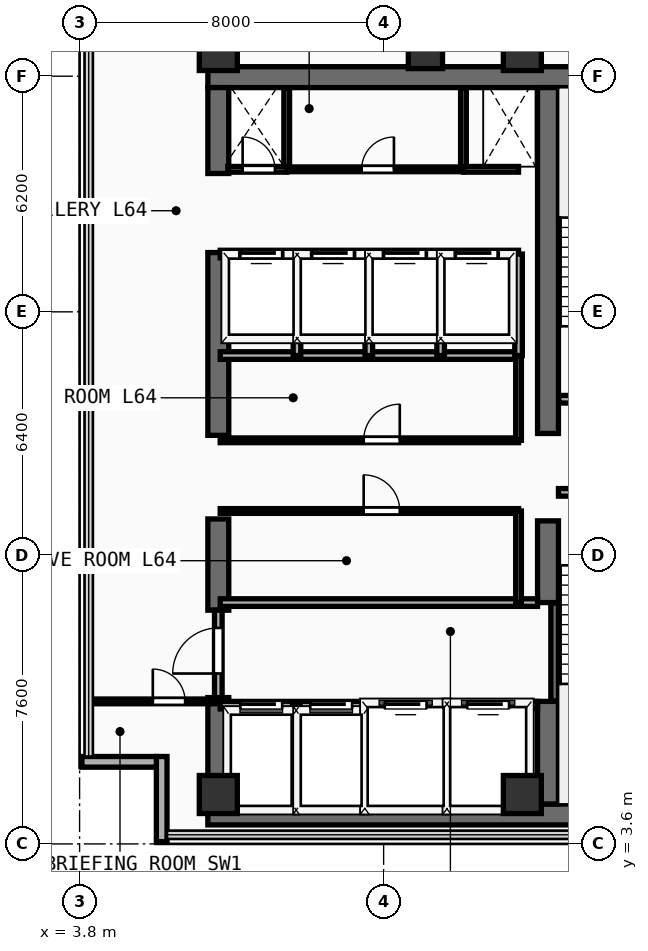
"""IFC4 building model, lengths in metres.
Left out: names, types, materials, properties, quantities, classifications, styles, units other than length and angle.
Written with IfcOpenShell. Run it as: python <this file> out.ifc"""

import sys

from ifc_helpers import new_model, si_unit, direction, frame, frame_2d, origin, origin_2d, place, context, subcontext, project, spatial, rectangle, extrude, element, fill, save


model = new_model("IFC4")
c1 = context("Model", 3, precision=1e-05, world=origin(), true_north=direction((0.0, 1.0)))
c2 = subcontext(c1, "Body", "Model", "MODEL_VIEW")
j1 = project(units=[si_unit("LENGTHUNIT", "METRE"), si_unit("PLANEANGLEUNIT", "RADIAN")], contexts=[c1])
p1 = place(None, origin())
s1 = spatial("IfcSite", under=j1, at=p1, CompositionType="ELEMENT")
p2 = place(p1, origin())
s2 = spatial("IfcBuilding", under=s1, at=p2, CompositionType="ELEMENT")
p3 = place(p2, frame((0.0, 0.0, 250.1)))
s3 = spatial("IfcBuildingStorey", under=s2, at=p3, CompositionType="ELEMENT", Elevation=250.1)
for number, where, z_axis, x_axis in (
    (1, (7.175, 4.375, 0.0), (0.0, 0.0, 1.0), (1.0, 0.0, 0.0)),
    (2, (7.175, 23.775, 0.0), (0.0, 0.0, 1.0), (1.0, 0.0, 0.0)),
):
    element("IfcWall", number, at=place(p3, frame(where, z_axis=z_axis, x_axis=x_axis)), inside=s3, PredefinedType="SHEAR", context=c2, shape_type="SweptSolid", body=[
        extrude(rectangle(XDim=13.9, YDim=0.55, at=frame_2d((6.95, 0.0))), origin(), (0.0, 0.0, 1.0), 3.56),
    ])
p4 = place(p3, frame((7.45, 4.65, 0.0), z_axis=(0.0, 0.0, 1.0), x_axis=(0.0, 1.0, 0.0)))
e3 = element("IfcWall", 3, at=p4, inside=s3, PredefinedType="SHEAR", context=c2, shape_type="SweptSolid", body=[
    extrude(rectangle(XDim=2.8, YDim=0.55, at=frame_2d((1.4, 0.0))), origin(), (0.0, 0.0, 1.0), 3.56),
])
p5 = place(p3, frame((7.45, 9.75, 0.0), z_axis=(0.0, 0.0, 1.0), x_axis=(0.0, 1.0, 0.0)))
e4 = element("IfcWall", 4, at=p5, inside=s3, PredefinedType="SHEAR", context=c2, shape_type="SweptSolid", body=[
    extrude(rectangle(XDim=2.4, YDim=0.55, at=frame_2d((1.2, 0.0))), origin(), (0.0, 0.0, 1.0), 3.56),
])
p6 = place(p3, frame((7.45, 14.35, 0.0), z_axis=(0.0, 0.0, 1.0), x_axis=(0.0, 1.0, 0.0)))
e5 = element("IfcWall", 5, at=p6, inside=s3, PredefinedType="SHEAR", context=c2, shape_type="SweptSolid", body=[
    extrude(rectangle(XDim=4.81, YDim=0.55, at=frame_2d((2.405, 0.0))), origin(), (0.0, 0.0, 1.0), 3.56),
])
p7 = place(p3, frame((7.45, 21.24, 0.0), z_axis=(0.0, 0.0, 1.0), x_axis=(0.0, 1.0, 0.0)))
e6 = element("IfcWall", 6, at=p7, inside=s3, PredefinedType="SHEAR", context=c2, shape_type="SweptSolid", body=[
    extrude(rectangle(XDim=2.26, YDim=0.55, at=frame_2d((1.13, 0.0))), origin(), (0.0, 0.0, 1.0), 3.56),
])
p8 = place(p3, frame((16.125, 4.65, 0.0), z_axis=(0.0, 0.0, 1.0), x_axis=(0.0, 1.0, 0.0)))
e7 = element("IfcWall", 7, at=p8, inside=s3, PredefinedType="SHEAR", context=c2, shape_type="SweptSolid", body=[
    extrude(rectangle(XDim=2.7, YDim=0.55, at=frame_2d((1.35, 0.0))), origin(), (0.0, 0.0, 1.0), 3.56),
])
p9 = place(p3, frame((16.125, 9.95, 0.0), z_axis=(0.0, 0.0, 1.0), x_axis=(0.0, 1.0, 0.0)))
e8 = element("IfcWall", 8, at=p9, inside=s3, PredefinedType="SHEAR", context=c2, shape_type="SweptSolid", body=[
    extrude(rectangle(XDim=2.15, YDim=0.55, at=frame_2d((1.075, 0.0))), origin(), (0.0, 0.0, 1.0), 3.56),
])
p10 = place(p3, frame((16.125, 14.4, 0.0), z_axis=(0.0, 0.0, 1.0), x_axis=(0.0, 1.0, 0.0)))
e9 = element("IfcWall", 9, at=p10, inside=s3, PredefinedType="SHEAR", context=c2, shape_type="SweptSolid", body=[
    extrude(rectangle(XDim=9.1, YDim=0.55, at=frame_2d((4.55, 0.0))), origin(), (0.0, 0.0, 1.0), 3.56),
])
for number, where, z_axis, x_axis in (
    (10, (7.45, 4.9, 0.0), (0.0, 0.0, 1.0), (1.0, 0.0, 0.0)),
    (11, (15.45, 4.9, 0.0), (0.0, 0.0, 1.0), (1.0, 0.0, 0.0)),
    (12, (7.45, 24.45, 0.0), (0.0, 0.0, 1.0), (1.0, 0.0, 0.0)),
    (13, (15.45, 24.45, 0.0), (0.0, 0.0, 1.0), (1.0, 0.0, 0.0)),
):
    element("IfcColumn", number, at=place(p3, frame(where, z_axis=z_axis, x_axis=x_axis)), inside=s3, PredefinedType="COLUMN", context=c2, shape_type="SweptSolid", body=[
        extrude(rectangle(XDim=1.0, YDim=1.0, at=origin_2d()), origin(), (0.0, 0.0, 1.0), 3.56),
    ])
p11 = place(p3, frame((12.9, 24.45, 0.0), z_axis=(0.0, 0.0, 1.0), x_axis=(1.0, 0.0, 0.0)))
e14 = element("IfcColumn", 14, at=p11, inside=s3, PredefinedType="COLUMN", context=c2, shape_type="SweptSolid", body=[
    extrude(rectangle(XDim=0.9, YDim=0.9, at=origin_2d()), origin(), (0.0, 0.0, 1.0), 3.56),
])
p12 = place(p3, frame((5.96, 3.66, 0.0), z_axis=(0.0, 0.0, 1.0), x_axis=(0.0, 1.0, 0.0)))
e15 = element("IfcWall", 15, at=p12, inside=s3, PredefinedType="SOLIDWALL", context=c2, shape_type="SweptSolid", body=[
    extrude(rectangle(XDim=2.24, YDim=0.28, at=frame_2d((1.12, 0.0))), origin(), (0.0, 0.0, 1.0), 3.56),
])
p13 = place(p3, frame((3.86, 5.76, 0.0), z_axis=(0.0, 0.0, 1.0), x_axis=(1.0, 0.0, 0.0)))
e16 = element("IfcWall", 16, at=p13, inside=s3, PredefinedType="SOLIDWALL", context=c2, shape_type="SweptSolid", body=[
    extrude(rectangle(XDim=1.96, YDim=0.28, at=frame_2d((0.98, 0.0))), origin(), (0.0, 0.0, 1.0), 3.56),
])
p14 = place(p3, frame((16.3, 7.36, 0.0), z_axis=(0.0, 0.0, 1.0), x_axis=(0.0, 1.0, 0.0)))
e17 = element("IfcWall", 17, at=p14, inside=s3, PredefinedType="SHEAR", context=c2, shape_type="SweptSolid", body=[
    extrude(rectangle(XDim=2.58, YDim=0.2, at=frame_2d((1.29, 0.0))), origin(), (0.0, 0.0, 1.0), 3.56),
])
p15 = place(p3, frame((16.4, 12.85, 0.0), z_axis=(0.0, 0.0, 1.0), x_axis=(1.0, 0.0, 0.0)))
e18 = element("IfcWall", 18, at=p15, inside=s3, PredefinedType="PARTITIONING", context=c2, shape_type="SweptSolid", body=[
    extrude(rectangle(XDim=3.96, YDim=0.2, at=frame_2d((1.98, 0.0))), origin(), (0.0, 0.0, 1.0), 3.56),
])
p16 = place(p15, frame((1.304, 0.0, 0.0)))
e19 = element("IfcOpeningElement", 19, at=p16, cuts=e18, PredefinedType="OPENING", context=c2, shape_type="SweptSolid", body=[
    extrude(rectangle(XDim=1.1, YDim=2.2, at=frame_2d((0.55, 1.1))), frame((0.0, 0.11, 0.0), z_axis=(0.0, -1.0, 0.0), x_axis=(1.0, 0.0, 0.0)), (0.0, 0.0, 1.0), 0.22),
])
p17 = place(p3, frame((16.41, 15.3, 0.0), z_axis=(0.0, 0.0, 1.0), x_axis=(1.0, 0.0, 0.0)))
e20 = element("IfcWall", 20, at=p17, inside=s3, PredefinedType="PARTITIONING", context=c2, shape_type="SweptSolid", body=[
    extrude(rectangle(XDim=3.95, YDim=0.2, at=frame_2d((1.975, 0.0))), origin(), (0.0, 0.0, 1.0), 3.56),
])
p18 = place(p17, frame((1.294, 0.0, 0.0)))
e21 = element("IfcOpeningElement", 21, at=p18, cuts=e20, PredefinedType="OPENING", context=c2, shape_type="SweptSolid", body=[
    extrude(rectangle(XDim=1.1, YDim=2.2, at=frame_2d((0.55, 1.1))), frame((0.0, 0.11, 0.0), z_axis=(0.0, -1.0, 0.0), x_axis=(1.0, 0.0, 0.0)), (0.0, 0.0, 1.0), 0.22),
])
p19 = place(p3, frame((7.5, 7.25, 0.0), z_axis=(0.0, 0.0, 1.0), x_axis=(1.0, 0.0, 0.0)))
e22 = element("IfcWall", 22, at=p19, inside=s3, PredefinedType="PARTITIONING", context=c2, shape_type="SweptSolid", body=[
    extrude(rectangle(XDim=8.35, YDim=0.2, at=frame_2d((4.175, 0.0))), origin(), (0.0, 0.0, 1.0), 3.56),
])
p20 = place(p19, frame((0.53, 0.0, 0.0)))
e23 = element("IfcOpeningElement", 23, at=p20, cuts=e22, PredefinedType="OPENING", context=c2, shape_type="SweptSolid", body=[
    extrude(rectangle(XDim=1.1, YDim=2.2, at=frame_2d((0.55, 1.1))), frame((0.0, 0.11, 0.0), z_axis=(0.0, -1.0, 0.0), x_axis=(1.0, 0.0, 0.0)), (0.0, 0.0, 1.0), 0.22),
])
p21 = place(p19, frame((2.37, 0.0, 0.0)))
e24 = element("IfcOpeningElement", 24, at=p21, cuts=e22, PredefinedType="OPENING", context=c2, shape_type="SweptSolid", body=[
    extrude(rectangle(XDim=1.1, YDim=2.2, at=frame_2d((0.55, 1.1))), frame((0.0, 0.11, 0.0), z_axis=(0.0, -1.0, 0.0), x_axis=(1.0, 0.0, 0.0)), (0.0, 0.0, 1.0), 0.22),
])
p22 = place(p19, frame((4.33, 0.0, 0.0)))
e25 = element("IfcOpeningElement", 25, at=p22, cuts=e22, PredefinedType="OPENING", context=c2, shape_type="SweptSolid", body=[
    extrude(rectangle(XDim=1.1, YDim=2.2, at=frame_2d((0.55, 1.1))), frame((0.0, 0.11, 0.0), z_axis=(0.0, -1.0, 0.0), x_axis=(1.0, 0.0, 0.0)), (0.0, 0.0, 1.0), 0.22),
])
p23 = place(p19, frame((6.5, 0.0, 0.0)))
e26 = element("IfcOpeningElement", 26, at=p23, cuts=e22, PredefinedType="OPENING", context=c2, shape_type="SweptSolid", body=[
    extrude(rectangle(XDim=1.1, YDim=2.2, at=frame_2d((0.55, 1.1))), frame((0.0, 0.11, 0.0), z_axis=(0.0, -1.0, 0.0), x_axis=(1.0, 0.0, 0.0)), (0.0, 0.0, 1.0), 0.22),
])
p24 = place(p3, frame((7.5, 9.95, 0.0), z_axis=(0.0, 0.0, 1.0), x_axis=(1.0, 0.0, 0.0)))
e27 = element("IfcWall", 27, at=p24, inside=s3, PredefinedType="PARTITIONING", context=c2, shape_type="SweptSolid", body=[
    extrude(rectangle(XDim=8.35, YDim=0.2, at=frame_2d((4.175, 0.0))), origin(), (0.0, 0.0, 1.0), 3.56),
])
for number, where, z_axis, x_axis in (
    (28, (9.5, 4.45, 0.0), (0.0, 0.0, 1.0), (0.0, 1.0, 0.0)),
    (29, (11.36, 4.45, 0.0), (0.0, 0.0, 1.0), (0.0, 1.0, 0.0)),
    (30, (13.46, 4.45, 0.0), (0.0, 0.0, 1.0), (0.0, 1.0, 0.0)),
):
    element("IfcWall", number, at=place(p3, frame(where, z_axis=z_axis, x_axis=x_axis)), inside=s3, PredefinedType="PARTITIONING", context=c2, shape_type="SweptSolid", body=[
        extrude(rectangle(XDim=2.8, YDim=0.2, at=frame_2d((1.4, 0.0))), origin(), (0.0, 0.0, 1.0), 3.56),
    ])
p25 = place(p3, frame((7.45, 7.45, 0.0), z_axis=(0.0, 0.0, 1.0), x_axis=(0.0, 1.0, 0.0)))
e31 = element("IfcWall", 31, at=p25, inside=s3, PredefinedType="PARTITIONING", context=c2, shape_type="SweptSolid", body=[
    extrude(rectangle(XDim=2.3, YDim=0.2, at=frame_2d((1.15, 0.0))), origin(), (0.0, 0.0, 1.0), 2.54),
])
p26 = place(p25, frame((0.633, 0.0, 0.0)))
e32 = element("IfcOpeningElement", 32, at=p26, cuts=e31, PredefinedType="OPENING", context=c2, shape_type="SweptSolid", body=[
    extrude(rectangle(XDim=1.2, YDim=2.25, at=frame_2d((0.6, 1.125))), frame((0.0, 0.11, 0.0), z_axis=(0.0, -1.0, 0.0), x_axis=(1.0, 0.0, 0.0)), (0.0, 0.0, 1.0), 0.22),
])
p27 = place(p3, frame((7.5, 16.45, 0.0), z_axis=(0.0, 0.0, 1.0), x_axis=(1.0, 0.0, 0.0)))
e33 = element("IfcWall", 33, at=p27, inside=s3, PredefinedType="PARTITIONING", context=c2, shape_type="SweptSolid", body=[
    extrude(rectangle(XDim=7.85, YDim=0.2, at=frame_2d((3.925, 0.0))), origin(), (0.0, 0.0, 1.0), 3.56),
])
p28 = place(p3, frame((7.5, 12.36, 0.0), z_axis=(0.0, 0.0, 1.0), x_axis=(1.0, 0.0, 0.0)))
e34 = element("IfcWall", 34, at=p28, inside=s3, PredefinedType="PARTITIONING", context=c2, shape_type="SweptSolid", body=[
    extrude(rectangle(XDim=7.85, YDim=0.125, at=frame_2d((3.925, 0.0))), origin(), (0.0, 0.0, 1.0), 3.56),
])
p29 = place(p28, frame((3.775, 0.0, 0.0)))
e35 = element("IfcOpeningElement", 35, at=p29, cuts=e34, PredefinedType="OPENING", context=c2, shape_type="SweptSolid", body=[
    extrude(rectangle(XDim=0.95, YDim=2.15, at=frame_2d((0.475, 1.075))), frame((0.0, 0.073, 0.0), z_axis=(0.0, -1.0, 0.0), x_axis=(1.0, 0.0, 0.0)), (0.0, 0.0, 1.0), 0.145),
])
p30 = place(p3, frame((7.5, 14.22, 0.0), z_axis=(0.0, 0.0, 1.0), x_axis=(1.0, 0.0, 0.0)))
e36 = element("IfcWall", 36, at=p30, inside=s3, PredefinedType="PARTITIONING", context=c2, shape_type="SweptSolid", body=[
    extrude(rectangle(XDim=7.85, YDim=0.125, at=frame_2d((3.925, 0.0))), origin(), (0.0, 0.0, 1.0), 3.56),
])
p31 = place(p30, frame((3.775, 0.0, 0.0)))
e37 = element("IfcOpeningElement", 37, at=p31, cuts=e36, PredefinedType="OPENING", context=c2, shape_type="SweptSolid", body=[
    extrude(rectangle(XDim=0.95, YDim=2.15, at=frame_2d((0.475, 1.075))), frame((0.0, 0.073, 0.0), z_axis=(0.0, -1.0, 0.0), x_axis=(1.0, 0.0, 0.0)), (0.0, 0.0, 1.0), 0.145),
])
p32 = place(p3, frame((15.35, 9.95, 0.0), z_axis=(0.0, 0.0, 1.0), x_axis=(0.0, 1.0, 0.0)))
e38 = element("IfcWall", 38, at=p32, inside=s3, PredefinedType="PARTITIONING", context=c2, shape_type="SweptSolid", body=[
    extrude(rectangle(XDim=2.41, YDim=0.15, at=frame_2d((1.205, 0.0))), origin(), (0.0, 0.0, 1.0), 3.56),
])
p33 = place(p3, frame((15.35, 14.22, 0.0), z_axis=(0.0, 0.0, 1.0), x_axis=(0.0, 1.0, 0.0)))
e39 = element("IfcWall", 39, at=p33, inside=s3, PredefinedType="PARTITIONING", context=c2, shape_type="SweptSolid", body=[
    extrude(rectangle(XDim=2.23, YDim=0.15, at=frame_2d((1.115, 0.0))), origin(), (0.0, 0.0, 1.0), 3.56),
])
p34 = place(p3, frame((7.5, 19.12, 0.0), z_axis=(0.0, 0.0, 1.0), x_axis=(1.0, 0.0, 0.0)))
e40 = element("IfcWall", 40, at=p34, inside=s3, PredefinedType="PARTITIONING", context=c2, shape_type="SweptSolid", body=[
    extrude(rectangle(XDim=7.85, YDim=0.2, at=frame_2d((3.925, 0.0))), origin(), (0.0, 0.0, 1.0), 3.56),
])
p35 = place(p34, frame((0.53, 0.0, 0.0)))
e41 = element("IfcOpeningElement", 41, at=p35, cuts=e40, PredefinedType="OPENING", context=c2, shape_type="SweptSolid", body=[
    extrude(rectangle(XDim=1.1, YDim=2.2, at=frame_2d((0.55, 1.1))), frame((0.0, 0.11, 0.0), z_axis=(0.0, -1.0, 0.0), x_axis=(1.0, 0.0, 0.0)), (0.0, 0.0, 1.0), 0.22),
])
p36 = place(p34, frame((2.42, 0.0, 0.0)))
e42 = element("IfcOpeningElement", 42, at=p36, cuts=e40, PredefinedType="OPENING", context=c2, shape_type="SweptSolid", body=[
    extrude(rectangle(XDim=1.1, YDim=2.2, at=frame_2d((0.55, 1.1))), frame((0.0, 0.11, 0.0), z_axis=(0.0, -1.0, 0.0), x_axis=(1.0, 0.0, 0.0)), (0.0, 0.0, 1.0), 0.22),
])
p37 = place(p34, frame((4.31, 0.0, 0.0)))
e43 = element("IfcOpeningElement", 43, at=p37, cuts=e40, PredefinedType="OPENING", context=c2, shape_type="SweptSolid", body=[
    extrude(rectangle(XDim=1.1, YDim=2.2, at=frame_2d((0.55, 1.1))), frame((0.0, 0.11, 0.0), z_axis=(0.0, -1.0, 0.0), x_axis=(1.0, 0.0, 0.0)), (0.0, 0.0, 1.0), 0.22),
])
p38 = place(p34, frame((6.2, 0.0, 0.0)))
e44 = element("IfcOpeningElement", 44, at=p38, cuts=e40, PredefinedType="OPENING", context=c2, shape_type="SweptSolid", body=[
    extrude(rectangle(XDim=1.1, YDim=2.2, at=frame_2d((0.55, 1.1))), frame((0.0, 0.11, 0.0), z_axis=(0.0, -1.0, 0.0), x_axis=(1.0, 0.0, 0.0)), (0.0, 0.0, 1.0), 0.22),
])
for number, where, z_axis, x_axis in (
    (45, (15.35, 16.45, 0.0), (0.0, 0.0, 1.0), (0.0, 1.0, 0.0)),
    (46, (9.52, 16.45, 0.0), (0.0, 0.0, 1.0), (0.0, 1.0, 0.0)),
    (47, (11.41, 16.45, 0.0), (0.0, 0.0, 1.0), (0.0, 1.0, 0.0)),
    (48, (13.3, 16.45, 0.0), (0.0, 0.0, 1.0), (0.0, 1.0, 0.0)),
):
    element("IfcWall", number, at=place(p3, frame(where, z_axis=z_axis, x_axis=x_axis)), inside=s3, PredefinedType="PARTITIONING", context=c2, shape_type="SweptSolid", body=[
        extrude(rectangle(XDim=2.67, YDim=0.2, at=frame_2d((1.335, 0.0))), origin(), (0.0, 0.0, 1.0), 3.56),
    ])
for number, where, z_axis, x_axis in (
    (49, (9.25, 21.35, 0.0), (0.0, 0.0, 1.0), (0.0, 1.0, 0.0)),
    (50, (13.9, 21.35, 0.0), (0.0, 0.0, 1.0), (0.0, 1.0, 0.0)),
):
    element("IfcWall", number, at=place(p3, frame(where, z_axis=z_axis, x_axis=x_axis)), inside=s3, PredefinedType="PARTITIONING", context=c2, shape_type="SweptSolid", body=[
        extrude(rectangle(XDim=2.13, YDim=0.15, at=frame_2d((1.065, 0.0))), origin(), (0.0, 0.0, 1.0), 3.56),
    ])
p39 = place(p3, frame((7.7, 21.35, 0.0), z_axis=(0.0, 0.0, 1.0), x_axis=(1.0, 0.0, 0.0)))
e51 = element("IfcWall", 51, at=p39, inside=s3, PredefinedType="PARTITIONING", context=c2, shape_type="SweptSolid", body=[
    extrude(rectangle(XDim=1.55, YDim=0.15, at=frame_2d((0.775, 0.0))), origin(), (0.0, 0.0, 1.0), 3.56),
])
p40 = place(p39, frame((0.39, 0.0, 0.0)))
e52 = element("IfcOpeningElement", 52, at=p40, cuts=e51, PredefinedType="OPENING", context=c2, shape_type="SweptSolid", body=[
    extrude(rectangle(XDim=0.85, YDim=2.15, at=frame_2d((0.425, 1.075))), frame((0.0, 0.085, 0.0), z_axis=(0.0, -1.0, 0.0), x_axis=(1.0, 0.0, 0.0)), (0.0, 0.0, 1.0), 0.17),
])
p41 = place(p3, frame((13.9, 21.35, 0.0), z_axis=(0.0, 0.0, 1.0), x_axis=(1.0, 0.0, 0.0)))
e53 = element("IfcWall", 53, at=p41, inside=s3, PredefinedType="PARTITIONING", context=c2, shape_type="SweptSolid", body=[
    extrude(rectangle(XDim=1.45, YDim=0.15, at=frame_2d((0.725, 0.0))), origin(), (0.0, 0.0, 1.0), 3.56),
])
p42 = place(p3, frame((9.25, 21.35, 0.0), z_axis=(0.0, 0.0, 1.0), x_axis=(1.0, 0.0, 0.0)))
e54 = element("IfcWall", 54, at=p42, inside=s3, PredefinedType="PARTITIONING", context=c2, shape_type="SweptSolid", body=[
    extrude(rectangle(XDim=4.65, YDim=0.125, at=frame_2d((2.325, 0.0))), origin(), (0.0, 0.0, 1.0), 3.56),
])
p43 = place(p42, frame((1.971, 0.0, 0.0)))
e55 = element("IfcOpeningElement", 55, at=p43, cuts=e54, PredefinedType="OPENING", context=c2, shape_type="SweptSolid", body=[
    extrude(rectangle(XDim=0.85, YDim=2.15, at=frame_2d((0.425, 1.075))), frame((0.0, 0.073, 0.0), z_axis=(0.0, -1.0, 0.0), x_axis=(1.0, 0.0, 0.0)), (0.0, 0.0, 1.0), 0.145),
])
p44 = place(p3, frame((4.04, 7.35, 0.0), z_axis=(0.0, 0.0, 1.0), x_axis=(1.0, 0.0, 0.0)))
e56 = element("IfcWall", 56, at=p44, inside=s3, PredefinedType="PARTITIONING", context=c2, shape_type="SweptSolid", body=[
    extrude(rectangle(XDim=3.36, YDim=0.125, at=frame_2d((1.68, 0.0))), origin(), (0.0, 0.0, 1.0), 3.56),
])
p45 = place(p44, frame((1.687, 0.0, 0.0)))
e57 = element("IfcOpeningElement", 57, at=p45, cuts=e56, PredefinedType="OPENING", context=c2, shape_type="SweptSolid", body=[
    extrude(rectangle(XDim=0.85, YDim=2.15, at=frame_2d((0.425, 1.075))), frame((0.0, 0.073, 0.0), z_axis=(0.0, -1.0, 0.0), x_axis=(1.0, 0.0, 0.0)), (0.0, 0.0, 1.0), 0.145),
])
p46 = place(p20, origin())
e58 = element("IfcDoor", 58, at=p46, inside=s3, OperationType="SLIDING_TO_LEFT", PredefinedType="DOOR", context=c2, shape_type="SweptSolid", body=[
    extrude(rectangle(XDim=1.1, YDim=2.2, at=frame_2d((0.55, 1.1))), frame((0.0, 0.025, 0.0), z_axis=(0.0, -1.0, 0.0), x_axis=(1.0, 0.0, 0.0)), (0.0, 0.0, 1.0), 0.05),
])
fill(e23, e58)
p47 = place(p21, origin())
e59 = element("IfcDoor", 59, at=p47, inside=s3, OperationType="SLIDING_TO_LEFT", PredefinedType="DOOR", context=c2, shape_type="SweptSolid", body=[
    extrude(rectangle(XDim=1.1, YDim=2.2, at=frame_2d((0.55, 1.1))), frame((0.0, 0.025, 0.0), z_axis=(0.0, -1.0, 0.0), x_axis=(1.0, 0.0, 0.0)), (0.0, 0.0, 1.0), 0.05),
])
fill(e24, e59)
p48 = place(p22, origin())
e60 = element("IfcDoor", 60, at=p48, inside=s3, OperationType="SLIDING_TO_LEFT", PredefinedType="DOOR", context=c2, shape_type="SweptSolid", body=[
    extrude(rectangle(XDim=1.1, YDim=2.2, at=frame_2d((0.55, 1.1))), frame((0.0, 0.025, 0.0), z_axis=(0.0, -1.0, 0.0), x_axis=(1.0, 0.0, 0.0)), (0.0, 0.0, 1.0), 0.05),
])
fill(e25, e60)
p49 = place(p23, origin())
e61 = element("IfcDoor", 61, at=p49, inside=s3, OperationType="SLIDING_TO_LEFT", PredefinedType="DOOR", context=c2, shape_type="SweptSolid", body=[
    extrude(rectangle(XDim=1.1, YDim=2.2, at=frame_2d((0.55, 1.1))), frame((0.0, 0.025, 0.0), z_axis=(0.0, -1.0, 0.0), x_axis=(1.0, 0.0, 0.0)), (0.0, 0.0, 1.0), 0.05),
])
fill(e26, e61)
p50 = place(p26, frame((1.2, 0.0, 0.0), z_axis=(0.0, 0.0, 1.0), x_axis=(-1.0, 0.0, 0.0)))
e62 = element("IfcDoor", 62, at=p50, inside=s3, OperationType="SINGLE_SWING_RIGHT", PredefinedType="DOOR", context=c2, shape_type="SweptSolid", body=[
    extrude(rectangle(XDim=1.2, YDim=2.25, at=frame_2d((0.6, 1.125))), frame((0.0, 0.025, 0.0), z_axis=(0.0, -1.0, 0.0), x_axis=(1.0, 0.0, 0.0)), (0.0, 0.0, 1.0), 0.05),
])
fill(e32, e62)
p51 = place(p29, origin())
e63 = element("IfcDoor", 63, at=p51, inside=s3, OperationType="SINGLE_SWING_LEFT", PredefinedType="DOOR", context=c2, shape_type="SweptSolid", body=[
    extrude(rectangle(XDim=0.95, YDim=2.15, at=frame_2d((0.475, 1.075))), frame((0.0, 0.025, 0.0), z_axis=(0.0, -1.0, 0.0), x_axis=(1.0, 0.0, 0.0)), (0.0, 0.0, 1.0), 0.05),
])
fill(e35, e63)
p52 = place(p31, origin())
e64 = element("IfcDoor", 64, at=p52, inside=s3, OperationType="SINGLE_SWING_RIGHT", PredefinedType="DOOR", context=c2, shape_type="SweptSolid", body=[
    extrude(rectangle(XDim=0.95, YDim=2.15, at=frame_2d((0.475, 1.075))), frame((0.0, 0.025, 0.0), z_axis=(0.0, -1.0, 0.0), x_axis=(1.0, 0.0, 0.0)), (0.0, 0.0, 1.0), 0.05),
])
fill(e37, e64)
p53 = place(p35, origin())
e65 = element("IfcDoor", 65, at=p53, inside=s3, OperationType="SLIDING_TO_LEFT", PredefinedType="DOOR", context=c2, shape_type="SweptSolid", body=[
    extrude(rectangle(XDim=1.1, YDim=2.2, at=frame_2d((0.55, 1.1))), frame((0.0, 0.025, 0.0), z_axis=(0.0, -1.0, 0.0), x_axis=(1.0, 0.0, 0.0)), (0.0, 0.0, 1.0), 0.05),
])
fill(e41, e65)
p54 = place(p36, origin())
e66 = element("IfcDoor", 66, at=p54, inside=s3, OperationType="SLIDING_TO_LEFT", PredefinedType="DOOR", context=c2, shape_type="SweptSolid", body=[
    extrude(rectangle(XDim=1.1, YDim=2.2, at=frame_2d((0.55, 1.1))), frame((0.0, 0.025, 0.0), z_axis=(0.0, -1.0, 0.0), x_axis=(1.0, 0.0, 0.0)), (0.0, 0.0, 1.0), 0.05),
])
fill(e42, e66)
p55 = place(p37, origin())
e67 = element("IfcDoor", 67, at=p55, inside=s3, OperationType="SLIDING_TO_LEFT", PredefinedType="DOOR", context=c2, shape_type="SweptSolid", body=[
    extrude(rectangle(XDim=1.1, YDim=2.2, at=frame_2d((0.55, 1.1))), frame((0.0, 0.025, 0.0), z_axis=(0.0, -1.0, 0.0), x_axis=(1.0, 0.0, 0.0)), (0.0, 0.0, 1.0), 0.05),
])
fill(e43, e67)
p56 = place(p38, origin())
e68 = element("IfcDoor", 68, at=p56, inside=s3, OperationType="SLIDING_TO_LEFT", PredefinedType="DOOR", context=c2, shape_type="SweptSolid", body=[
    extrude(rectangle(XDim=1.1, YDim=2.2, at=frame_2d((0.55, 1.1))), frame((0.0, 0.025, 0.0), z_axis=(0.0, -1.0, 0.0), x_axis=(1.0, 0.0, 0.0)), (0.0, 0.0, 1.0), 0.05),
])
fill(e44, e68)
p57 = place(p40, origin())
e69 = element("IfcDoor", 69, at=p57, inside=s3, OperationType="SINGLE_SWING_LEFT", PredefinedType="DOOR", context=c2, shape_type="SweptSolid", body=[
    extrude(rectangle(XDim=0.85, YDim=2.15, at=frame_2d((0.425, 1.075))), frame((0.0, 0.025, 0.0), z_axis=(0.0, -1.0, 0.0), x_axis=(1.0, 0.0, 0.0)), (0.0, 0.0, 1.0), 0.05),
])
fill(e52, e69)
p58 = place(p43, origin())
e70 = element("IfcDoor", 70, at=p58, inside=s3, OperationType="SINGLE_SWING_RIGHT", PredefinedType="DOOR", context=c2, shape_type="SweptSolid", body=[
    extrude(rectangle(XDim=0.85, YDim=2.15, at=frame_2d((0.425, 1.075))), frame((0.0, 0.025, 0.0), z_axis=(0.0, -1.0, 0.0), x_axis=(1.0, 0.0, 0.0)), (0.0, 0.0, 1.0), 0.05),
])
fill(e55, e70)
p59 = place(p45, origin())
e71 = element("IfcDoor", 71, at=p59, inside=s3, OperationType="SINGLE_SWING_LEFT", PredefinedType="DOOR", context=c2, shape_type="SweptSolid", body=[
    extrude(rectangle(XDim=0.85, YDim=2.15, at=frame_2d((0.425, 1.075))), frame((0.0, 0.025, 0.0), z_axis=(0.0, -1.0, 0.0), x_axis=(1.0, 0.0, 0.0)), (0.0, 0.0, 1.0), 0.05),
])
fill(e57, e71)
save(model, sys.argv[1])
